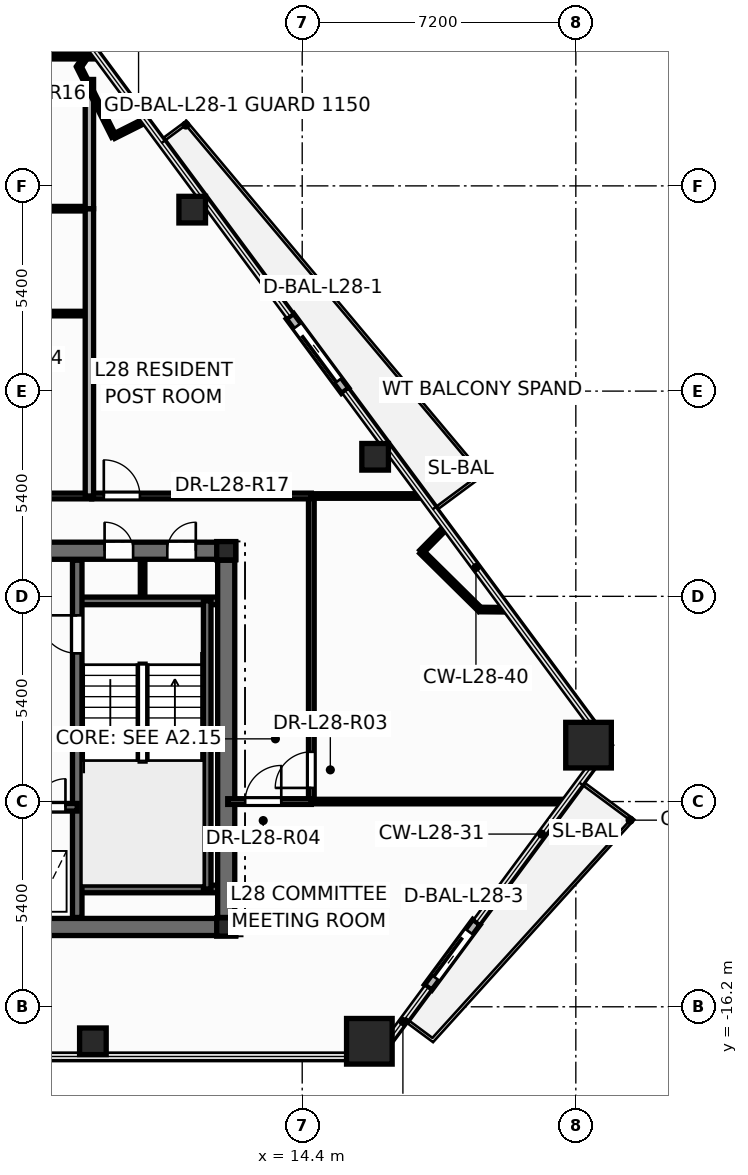
"""IFC4 building model, lengths in metres.
Left out: names, types, materials, properties, quantities, classifications, styles, units other than length and angle.
Written with IfcOpenShell. Run it as: python <this file> out.ifc"""

import sys

from ifc_helpers import new_model, si_unit, direction, frame, frame_2d, origin, origin_2d, place, context, subcontext, project, spatial, rectangle, hollow_rectangle, hollow_circle, i_section, extrude, element, fill, save


model = new_model("IFC4")
c1 = context("Model", 3, precision=1e-05, world=origin(), true_north=direction((0.0, 1.0)))
c2 = subcontext(c1, "Body", "Model", "MODEL_VIEW")
j1 = project(units=[si_unit("LENGTHUNIT", "METRE"), si_unit("PLANEANGLEUNIT", "RADIAN")], contexts=[c1])
p1 = place(None, origin())
s1 = spatial("IfcSite", under=j1, at=p1, CompositionType="ELEMENT")
p2 = place(p1, origin())
s2 = spatial("IfcBuilding", under=s1, at=p2, CompositionType="ELEMENT")
p3 = place(p2, frame((0.0, 0.0, 110.4)))
s3 = spatial("IfcBuildingStorey", under=s2, at=p3, CompositionType="ELEMENT", Elevation=110.4)
for number, where, z_axis, x_axis in (
    (1, (16.167, -17.108, 0.0), (0.0, 0.0, 1.0), (1.0, 0.0, 0.0)),
    (2, (21.934, -9.316, 0.0), (0.0, 0.0, 1.0), (1.0, 0.0, 0.0)),
):
    element("IfcColumn", number, at=place(p3, frame(where, z_axis=z_axis, x_axis=x_axis)), inside=s3, PredefinedType="COLUMN", context=c2, shape_type="SweptSolid", body=[
        extrude(hollow_rectangle(XDim=1.2, YDim=1.2, WallThickness=0.055, at=origin_2d()), origin(), (0.0, 0.0, 1.0), 3.6),
    ])
for number, where, z_axis, x_axis in (
    (3, (8.892, -17.108, 0.0), (0.0, 0.0, 1.0), (1.0, 0.0, 0.0)),
    (4, (16.319, -1.729, 0.0), (0.0, 0.0, 1.0), (1.0, 0.0, 0.0)),
    (5, (11.506, 4.775, 0.0), (0.0, 0.0, 1.0), (1.0, 0.0, 0.0)),
):
    element("IfcColumn", number, at=place(p3, frame(where, z_axis=z_axis, x_axis=x_axis)), inside=s3, PredefinedType="COLUMN", context=c2, shape_type="SweptSolid", body=[
        extrude(hollow_circle(Radius=0.35, WallThickness=0.03, at=origin_2d()), origin(), (0.0, 0.0, 1.0), 3.6),
    ])
for number, where, z_axis, x_axis in (
    (6, (12.4, -14.1, 0.0), (0.0, 0.0, 1.0), (1.0, 0.0, 0.0)),
    (7, (12.4, -4.2, 0.0), (0.0, 0.0, 1.0), (1.0, 0.0, 0.0)),
):
    element("IfcColumn", number, at=place(p3, frame(where, z_axis=z_axis, x_axis=x_axis)), inside=s3, PredefinedType="COLUMN", context=c2, shape_type="SweptSolid", body=[
        extrude(i_section(OverallWidth=0.5, OverallDepth=0.482, WebThickness=0.04, FlangeThickness=0.045, at=origin_2d()), origin(), (0.0, 0.0, 1.0), 3.6),
    ])
p4 = place(p3, frame((15.53, 0.01, -0.015), z_axis=(0.0, 0.0, 1.0), x_axis=(-0.594897308784, 0.803801711868, 0.0)))
e8 = element("IfcWall", 8, at=p4, inside=s3, PredefinedType="STANDARD", context=c2, shape_type="SweptSolid", body=[
    extrude(rectangle(XDim=2.44, YDim=0.24, at=frame_2d((1.22, 0.0))), origin(), (0.0, 0.0, 1.0), 2.728),
])
p5 = place(p4, frame((0.32, 0.0, 0.015)))
e9 = element("IfcOpeningElement", 9, at=p5, cuts=e8, PredefinedType="OPENING", context=c2, shape_type="SweptSolid", body=[
    extrude(rectangle(XDim=1.806, YDim=2.204, at=frame_2d((0.9, 1.102))), frame((0.0, 0.13, 0.0), z_axis=(0.0, -1.0, 0.0), x_axis=(1.0, 0.0, 0.0)), (0.0, 0.0, 1.0), 0.26),
])
p6 = place(p3, frame((17.713, -15.691, -0.015), z_axis=(0.0, 0.0, 1.0), x_axis=(0.59491376708, 0.803789530747, 0.0)))
e10 = element("IfcWall", 10, at=p6, inside=s3, PredefinedType="STANDARD", context=c2, shape_type="SweptSolid", body=[
    extrude(rectangle(XDim=2.14, YDim=0.24, at=frame_2d((1.07, 0.0))), origin(), (0.0, 0.0, 1.0), 2.728),
])
p7 = place(p6, frame((0.32, 0.0, 0.015)))
e11 = element("IfcOpeningElement", 11, at=p7, cuts=e10, PredefinedType="OPENING", context=c2, shape_type="SweptSolid", body=[
    extrude(rectangle(XDim=1.506, YDim=2.204, at=frame_2d((0.75, 1.102))), frame((0.0, 0.13, 0.0), z_axis=(0.0, -1.0, 0.0), x_axis=(1.0, 0.0, 0.0)), (0.0, 0.0, 1.0), 0.26),
])
p8 = place(p3, frame((10.2, -5.52, 0.0), z_axis=(0.0, 0.0, 1.0), x_axis=(0.0, 1.0, 0.0)))
e12 = element("IfcWall", 12, at=p8, inside=s3, PredefinedType="PARTITIONING", context=c2, shape_type="SweptSolid", body=[
    extrude(rectangle(XDim=1.12, YDim=0.12, at=frame_2d((0.56, 0.0))), origin(), (0.0, 0.0, 1.0), 3.35),
])
p9 = place(p3, frame((-12.65, -14.1, 0.0), z_axis=(0.0, 0.0, 1.0), x_axis=(1.0, 0.0, 0.0)))
e13 = element("IfcWall", 13, at=p9, inside=s3, PredefinedType="SHEAR", context=c2, shape_type="SweptSolid", body=[
    extrude(rectangle(XDim=25.3, YDim=0.45, at=frame_2d((12.65, 0.0))), origin(), (0.0, 0.0, 1.0), 3.6),
])
p10 = place(p3, frame((-12.65, -4.2, 0.0), z_axis=(0.0, 0.0, 1.0), x_axis=(1.0, 0.0, 0.0)))
e14 = element("IfcWall", 14, at=p10, inside=s3, PredefinedType="SHEAR", context=c2, shape_type="SweptSolid", body=[
    extrude(rectangle(XDim=25.3, YDim=0.45, at=frame_2d((12.65, 0.0))), origin(), (0.0, 0.0, 1.0), 3.6),
])
p11 = place(p10, frame((1.85, 0.0, 0.0)))
e15 = element("IfcOpeningElement", 15, at=p11, cuts=e14, PredefinedType="OPENING", context=c2, shape_type="SweptSolid", body=[
    extrude(rectangle(XDim=0.756, YDim=2.054, at=frame_2d((0.375, 1.027))), frame((0.0, 0.235, 0.0), z_axis=(0.0, -1.0, 0.0), x_axis=(1.0, 0.0, 0.0)), (0.0, 0.0, 1.0), 0.47),
])
p12 = place(p10, frame((21.85, 0.0, 0.0)))
e16 = element("IfcOpeningElement", 16, at=p12, cuts=e14, PredefinedType="OPENING", context=c2, shape_type="SweptSolid", body=[
    extrude(rectangle(XDim=0.756, YDim=2.054, at=frame_2d((0.375, 1.027))), frame((0.0, 0.235, 0.0), z_axis=(0.0, -1.0, 0.0), x_axis=(1.0, 0.0, 0.0)), (0.0, 0.0, 1.0), 0.47),
])
p13 = place(p10, frame((23.5, 0.0, 0.0)))
e17 = element("IfcOpeningElement", 17, at=p13, cuts=e14, PredefinedType="OPENING", context=c2, shape_type="SweptSolid", body=[
    extrude(rectangle(XDim=0.756, YDim=2.054, at=frame_2d((0.375, 1.027))), frame((0.0, 0.235, 0.0), z_axis=(0.0, -1.0, 0.0), x_axis=(1.0, 0.0, 0.0)), (0.0, 0.0, 1.0), 0.47),
])
p14 = place(p10, frame((5.85, 0.0, 0.0)))
e18 = element("IfcOpeningElement", 18, at=p14, cuts=e14, PredefinedType="OPENING", context=c2, shape_type="SweptSolid", body=[
    extrude(rectangle(XDim=1.006, YDim=2.104, at=frame_2d((0.5, 1.052))), frame((0.0, 0.235, 0.0), z_axis=(0.0, -1.0, 0.0), x_axis=(1.0, 0.0, 0.0)), (0.0, 0.0, 1.0), 0.47),
])
p15 = place(p10, frame((10.35, 0.0, 0.0)))
e19 = element("IfcOpeningElement", 19, at=p15, cuts=e14, PredefinedType="OPENING", context=c2, shape_type="SweptSolid", body=[
    extrude(rectangle(XDim=1.406, YDim=2.154, at=frame_2d((0.7, 1.077))), frame((0.0, 0.235, 0.0), z_axis=(0.0, -1.0, 0.0), x_axis=(1.0, 0.0, 0.0)), (0.0, 0.0, 1.0), 0.47),
])
p16 = place(p10, frame((18.45, 0.0, 0.0)))
e20 = element("IfcOpeningElement", 20, at=p16, cuts=e14, PredefinedType="OPENING", context=c2, shape_type="SweptSolid", body=[
    extrude(rectangle(XDim=1.006, YDim=2.104, at=frame_2d((0.5, 1.052))), frame((0.0, 0.235, 0.0), z_axis=(0.0, -1.0, 0.0), x_axis=(1.0, 0.0, 0.0)), (0.0, 0.0, 1.0), 0.47),
])
for number, where, z_axis, x_axis in (
    (21, (8.48, -5.52, 0.0), (0.0, 0.0, 1.0), (1.0, 0.0, 0.0)),
    (22, (8.48, -13.1, 0.0), (0.0, 0.0, 1.0), (1.0, 0.0, 0.0)),
):
    element("IfcWall", number, at=place(p3, frame(where, z_axis=z_axis, x_axis=x_axis)), inside=s3, PredefinedType="SOLIDWALL", context=c2, shape_type="SweptSolid", body=[
        extrude(rectangle(XDim=3.87, YDim=0.2, at=frame_2d((1.935, 0.0))), origin(), (0.0, 0.0, 1.0), 3.6),
    ])
p17 = place(p3, frame((11.9, -13.1, 0.0), z_axis=(0.0, 0.0, 1.0), x_axis=(0.0, 1.0, 0.0)))
e23 = element("IfcWall", 23, at=p17, inside=s3, PredefinedType="SOLIDWALL", context=c2, shape_type="SweptSolid", body=[
    extrude(rectangle(XDim=7.58, YDim=0.2, at=frame_2d((3.79, 0.0))), origin(), (0.0, 0.0, 1.0), 3.6),
])
p18 = place(p3, frame((8.48, -13.85, 0.0), z_axis=(0.0, 0.0, 1.0), x_axis=(0.0, 1.0, 0.0)))
e24 = element("IfcWall", 24, at=p18, inside=s3, PredefinedType="SHEAR", context=c2, shape_type="SweptSolid", body=[
    extrude(rectangle(XDim=9.4, YDim=0.25, at=frame_2d((4.7, 0.0))), origin(), (0.0, 0.0, 1.0), 3.6),
])
p19 = place(p18, frame((6.95, 0.0, 0.0)))
e25 = element("IfcOpeningElement", 25, at=p19, cuts=e24, PredefinedType="OPENING", context=c2, shape_type="SweptSolid", body=[
    extrude(rectangle(XDim=1.006, YDim=2.104, at=frame_2d((0.5, 1.052))), frame((0.0, 0.135, 0.0), z_axis=(0.0, -1.0, 0.0), x_axis=(1.0, 0.0, 0.0)), (0.0, 0.0, 1.0), 0.27),
])
p20 = place(p3, frame((5.12, -10.95, 0.0), z_axis=(0.0, 0.0, 1.0), x_axis=(1.0, 0.0, 0.0)))
e26 = element("IfcWall", 26, at=p20, inside=s3, PredefinedType="SOLIDWALL", context=c2, shape_type="SweptSolid", body=[
    extrude(rectangle(XDim=3.36, YDim=0.2, at=frame_2d((1.68, 0.0))), origin(), (0.0, 0.0, 1.0), 3.6),
])
p21 = place(p20, frame((0.42, 0.0, 0.0)))
e27 = element("IfcOpeningElement", 27, at=p21, cuts=e26, PredefinedType="OPENING", context=c2, shape_type="SweptSolid", body=[
    extrude(rectangle(XDim=1.106, YDim=2.104, at=frame_2d((0.55, 1.052))), frame((0.0, 0.11, 0.0), z_axis=(0.0, -1.0, 0.0), x_axis=(1.0, 0.0, 0.0)), (0.0, 0.0, 1.0), 0.22),
])
p22 = place(p20, frame((2.3, 0.0, 0.0)))
e28 = element("IfcOpeningElement", 28, at=p22, cuts=e26, PredefinedType="OPENING", context=c2, shape_type="SweptSolid", body=[
    extrude(rectangle(XDim=0.756, YDim=2.054, at=frame_2d((0.375, 1.027))), frame((0.0, 0.11, 0.0), z_axis=(0.0, -1.0, 0.0), x_axis=(1.0, 0.0, 0.0)), (0.0, 0.0, 1.0), 0.22),
])
p23 = place(p3, frame((12.4, -13.85, 0.0), z_axis=(0.0, 0.0, 1.0), x_axis=(0.0, 1.0, 0.0)))
e29 = element("IfcWall", 29, at=p23, inside=s3, PredefinedType="SHEAR", context=c2, shape_type="SweptSolid", body=[
    extrude(rectangle(XDim=9.4, YDim=0.45, at=frame_2d((4.7, 0.0))), origin(), (0.0, 0.0, 1.0), 3.6),
])
p24 = place(p3, frame((14.64, -10.8, 0.0), z_axis=(0.0, 0.0, 1.0), x_axis=(0.0, 1.0, 0.0)))
e30 = element("IfcWall", 30, at=p24, inside=s3, PredefinedType="PARTITIONING", context=c2, shape_type="SweptSolid", body=[
    extrude(rectangle(XDim=8.04, YDim=0.15, at=frame_2d((4.02, 0.0))), origin(), (0.0, 0.0, 1.0), 2.325),
])
p25 = place(p24, frame((0.359, 0.0, 0.0)))
e31 = element("IfcOpeningElement", 31, at=p25, cuts=e30, PredefinedType="OPENING", context=c2, shape_type="SweptSolid", body=[
    extrude(rectangle(XDim=0.956, YDim=2.104, at=frame_2d((0.475, 1.052))), frame((0.0, 0.085, 0.0), z_axis=(0.0, -1.0, 0.0), x_axis=(1.0, 0.0, 0.0)), (0.0, 0.0, 1.0), 0.17),
])
p26 = place(p3, frame((14.64, -10.8, 0.0), z_axis=(0.0, 0.0, 1.0), x_axis=(1.0, 0.0, 0.0)))
e32 = element("IfcWall", 32, at=p26, inside=s3, PredefinedType="PARTITIONING", context=c2, shape_type="SweptSolid", body=[
    extrude(rectangle(XDim=6.693, YDim=0.12, at=frame_2d((3.347, 0.0))), origin(), (0.0, 0.0, 1.0), 2.713),
])
p27 = place(p3, frame((2.36, 8.8, 0.0), z_axis=(0.0, 0.0, 1.0), x_axis=(1.0, 0.0, 0.0)))
e33 = element("IfcWall", 33, at=p27, inside=s3, PredefinedType="PARTITIONING", context=c2, shape_type="SweptSolid", body=[
    extrude(rectangle(XDim=6.56, YDim=0.12, at=frame_2d((3.28, 0.0))), origin(), (0.0, 0.0, 1.0), 2.325),
])
p28 = place(p27, frame((4.384, 0.0, 0.0)))
e34 = element("IfcOpeningElement", 34, at=p28, cuts=e33, PredefinedType="OPENING", context=c2, shape_type="SweptSolid", body=[
    extrude(rectangle(XDim=0.926, YDim=2.104, at=frame_2d((0.46, 1.052))), frame((0.0, 0.07, 0.0), z_axis=(0.0, -1.0, 0.0), x_axis=(1.0, 0.0, 0.0)), (0.0, 0.0, 1.0), 0.14),
])
p29 = place(p3, frame((2.36, -2.76, 0.0), z_axis=(0.0, 0.0, 1.0), x_axis=(1.0, 0.0, 0.0)))
e35 = element("IfcWall", 35, at=p29, inside=s3, PredefinedType="PARTITIONING", context=c2, shape_type="SweptSolid", body=[
    extrude(rectangle(XDim=6.5, YDim=0.15, at=frame_2d((3.25, 0.0))), origin(), (0.0, 0.0, 1.0), 2.325),
])
p30 = place(p29, frame((0.36, 0.0, 0.0)))
e36 = element("IfcOpeningElement", 36, at=p30, cuts=e35, PredefinedType="OPENING", context=c2, shape_type="SweptSolid", body=[
    extrude(rectangle(XDim=0.956, YDim=2.104, at=frame_2d((0.475, 1.052))), frame((0.0, 0.085, 0.0), z_axis=(0.0, -1.0, 0.0), x_axis=(1.0, 0.0, 0.0)), (0.0, 0.0, 1.0), 0.17),
])
p31 = place(p3, frame((8.862, -2.76, 0.0), z_axis=(0.0, 0.0, 1.0), x_axis=(1.0, 0.0, 0.0)))
e37 = element("IfcWall", 37, at=p31, inside=s3, PredefinedType="PARTITIONING", context=c2, shape_type="SweptSolid", body=[
    extrude(rectangle(XDim=5.778, YDim=0.15, at=frame_2d((2.889, 0.0))), origin(), (0.0, 0.0, 1.0), 3.35),
])
p32 = place(p31, frame((0.317, 0.0, 0.0)))
e38 = element("IfcOpeningElement", 38, at=p32, cuts=e37, PredefinedType="OPENING", context=c2, shape_type="SweptSolid", body=[
    extrude(rectangle(XDim=0.956, YDim=2.104, at=frame_2d((0.475, 1.052))), frame((0.0, 0.085, 0.0), z_axis=(0.0, -1.0, 0.0), x_axis=(1.0, 0.0, 0.0)), (0.0, 0.0, 1.0), 0.17),
])
p33 = place(p3, frame((3.84, 2.04, 0.0), z_axis=(0.0, 0.0, 1.0), x_axis=(1.0, 0.0, 0.0)))
e39 = element("IfcWall", 39, at=p33, inside=s3, PredefinedType="PARTITIONING", context=c2, shape_type="SweptSolid", body=[
    extrude(rectangle(XDim=4.96, YDim=0.12, at=frame_2d((2.48, 0.0))), origin(), (0.0, 0.0, 1.0), 2.325),
])
p34 = place(p33, frame((0.397, 0.0, 0.0)))
e40 = element("IfcOpeningElement", 40, at=p34, cuts=e39, PredefinedType="OPENING", context=c2, shape_type="SweptSolid", body=[
    extrude(rectangle(XDim=0.926, YDim=2.104, at=frame_2d((0.46, 1.052))), frame((0.0, 0.07, 0.0), z_axis=(0.0, -1.0, 0.0), x_axis=(1.0, 0.0, 0.0)), (0.0, 0.0, 1.0), 0.14),
])
p35 = place(p3, frame((3.9, 4.8, 0.0), z_axis=(0.0, 0.0, 1.0), x_axis=(1.0, 0.0, 0.0)))
e41 = element("IfcWall", 41, at=p35, inside=s3, PredefinedType="PARTITIONING", context=c2, shape_type="SweptSolid", body=[
    extrude(rectangle(XDim=4.9, YDim=0.12, at=frame_2d((2.45, 0.0))), origin(), (0.0, 0.0, 1.0), 2.325),
])
p36 = place(p35, frame((0.359, 0.0, 0.0)))
e42 = element("IfcOpeningElement", 42, at=p36, cuts=e41, PredefinedType="OPENING", context=c2, shape_type="SweptSolid", body=[
    extrude(rectangle(XDim=0.926, YDim=2.104, at=frame_2d((0.46, 1.052))), frame((0.0, 0.07, 0.0), z_axis=(0.0, -1.0, 0.0), x_axis=(1.0, 0.0, 0.0)), (0.0, 0.0, 1.0), 0.14),
])
p37 = place(p3, frame((8.8, -2.76, 0.0), z_axis=(0.0, 0.0, 1.0), x_axis=(0.0, 1.0, 0.0)))
e43 = element("IfcWall", 43, at=p37, inside=s3, PredefinedType="PARTITIONING", context=c2, shape_type="SweptSolid", body=[
    extrude(rectangle(XDim=7.56, YDim=0.22, at=frame_2d((3.78, 0.0))), origin(), (0.0, 0.0, 1.0), 2.325),
])
p38 = place(p3, frame((8.8, 4.8, 0.0), z_axis=(0.0, 0.0, 1.0), x_axis=(0.0, 1.0, 0.0)))
e44 = element("IfcWall", 44, at=p38, inside=s3, PredefinedType="PARTITIONING", context=c2, shape_type="SweptSolid", body=[
    extrude(rectangle(XDim=3.4, YDim=0.22, at=frame_2d((1.7, 0.0))), origin(), (0.0, 0.0, 1.0), 2.325),
])
p39 = place(p3, frame((14.64, -2.76, 0.0), z_axis=(0.0, 0.0, 1.0), x_axis=(1.0, 0.0, 0.0)))
e45 = element("IfcWall", 45, at=p39, inside=s3, PredefinedType="PARTITIONING", context=c2, shape_type="SweptSolid", body=[
    extrude(rectangle(XDim=2.94, YDim=0.12, at=frame_2d((1.47, 0.0))), origin(), (0.0, 0.0, 1.0), 2.713),
])
p40 = place(p3, frame((12.44, -10.8, 0.0), z_axis=(0.0, 0.0, 1.0), x_axis=(1.0, 0.0, 0.0)))
e46 = element("IfcWall", 46, at=p40, inside=s3, PredefinedType="PARTITIONING", context=c2, shape_type="SweptSolid", body=[
    extrude(rectangle(XDim=2.2, YDim=0.15, at=frame_2d((1.1, 0.0))), origin(), (0.0, 0.0, 1.0), 2.713),
])
p41 = place(p40, frame((0.459, 0.0, 0.0)))
e47 = element("IfcOpeningElement", 47, at=p41, cuts=e46, PredefinedType="OPENING", context=c2, shape_type="SweptSolid", body=[
    extrude(rectangle(XDim=0.956, YDim=2.104, at=frame_2d((0.475, 1.052))), frame((0.0, 0.085, 0.0), z_axis=(0.0, -1.0, 0.0), x_axis=(1.0, 0.0, 0.0)), (0.0, 0.0, 1.0), 0.17),
])
p42 = place(p3, frame((9.442, 6.704, 0.0), z_axis=(0.0, 0.0, 1.0), x_axis=(-0.44873934971, 0.893662685817, 0.0)))
e48 = element("IfcWall", 48, at=p42, inside=s3, PredefinedType="PARTITIONING", context=c2, shape_type="SweptSolid", body=[
    extrude(rectangle(XDim=2.047, YDim=0.12, at=frame_2d((1.024, 0.0))), origin(), (0.0, 0.0, 1.0), 3.35),
])
p43 = place(p3, frame((19.077, -5.747, 0.0), z_axis=(0.0, 0.0, 1.0), x_axis=(-0.711889877925, 0.702291108949, 0.0)))
e49 = element("IfcWall", 49, at=p43, inside=s3, PredefinedType="PARTITIONING", context=c2, shape_type="SweptSolid", body=[
    extrude(rectangle(XDim=2.162, YDim=0.12, at=frame_2d((1.081, 0.0))), origin(), (0.0, 0.0, 1.0), 3.35),
])
p44 = place(p3, frame((10.26, 7.114, 0.0), z_axis=(0.0, 0.0, 1.0), x_axis=(-0.893678540504, -0.448707773771, 0.0)))
e50 = element("IfcWall", 50, at=p44, inside=s3, PredefinedType="PARTITIONING", context=c2, shape_type="SweptSolid", body=[
    extrude(rectangle(XDim=0.915, YDim=0.12, at=frame_2d((0.457, 0.0))), origin(), (0.0, 0.0, 1.0), 2.713),
])
p45 = place(p3, frame((17.538, -4.229, 0.0), z_axis=(0.0, 0.0, 1.0), x_axis=(0.702387049148, 0.711795218577, 0.0)))
e51 = element("IfcWall", 51, at=p45, inside=s3, PredefinedType="PARTITIONING", context=c2, shape_type="SweptSolid", body=[
    extrude(rectangle(XDim=0.908, YDim=0.12, at=frame_2d((0.454, 0.0))), origin(), (0.0, 0.0, 1.0), 2.713),
])
p46 = place(p3, frame((19.783, -5.753, 0.0), z_axis=(0.0, 0.0, 1.0), x_axis=(-0.999965519438, 0.008304211926, 0.0)))
e52 = element("IfcWall", 52, at=p46, inside=s3, PredefinedType="PARTITIONING", context=c2, shape_type="SweptSolid", body=[
    extrude(rectangle(XDim=0.706, YDim=0.12, at=frame_2d((0.353, 0.0))), origin(), (0.0, 0.0, 1.0), 2.713),
])
p47 = place(p3, frame((8.523, 8.533, 0.0), z_axis=(0.0, 0.0, 1.0), x_axis=(0.569035523294, 0.822312941179, 0.0)))
e53 = element("IfcWall", 53, at=p47, inside=s3, PredefinedType="PARTITIONING", context=c2, shape_type="SweptSolid", body=[
    extrude(rectangle(XDim=0.582, YDim=0.12, at=frame_2d((0.291, 0.0))), origin(), (0.0, 0.0, 1.0), 2.713),
])
p48 = place(p5, origin())
e54 = element("IfcDoor", 54, at=p48, inside=s3, OperationType="SLIDING_TO_LEFT", PredefinedType="DOOR", context=c2, shape_type="SweptSolid", body=[
    extrude(rectangle(XDim=1.8, YDim=2.2, at=frame_2d((0.9, 1.1))), frame((0.0, 0.025, 0.0), z_axis=(0.0, -1.0, 0.0), x_axis=(1.0, 0.0, 0.0)), (0.0, 0.0, 1.0), 0.05),
])
fill(e9, e54)
p49 = place(p7, origin())
e55 = element("IfcDoor", 55, at=p49, inside=s3, OperationType="SLIDING_TO_RIGHT", PredefinedType="DOOR", context=c2, shape_type="SweptSolid", body=[
    extrude(rectangle(XDim=1.5, YDim=2.2, at=frame_2d((0.75, 1.1))), frame((0.0, 0.025, 0.0), z_axis=(0.0, -1.0, 0.0), x_axis=(1.0, 0.0, 0.0)), (0.0, 0.0, 1.0), 0.05),
])
fill(e11, e55)
p50 = place(p19, origin())
e56 = element("IfcDoor", 56, at=p50, inside=s3, OperationType="SINGLE_SWING_RIGHT", PredefinedType="DOOR", context=c2, shape_type="SweptSolid", body=[
    extrude(rectangle(XDim=1.0, YDim=2.1, at=frame_2d((0.5, 1.05))), frame((0.0, 0.025, 0.0), z_axis=(0.0, -1.0, 0.0), x_axis=(1.0, 0.0, 0.0)), (0.0, 0.0, 1.0), 0.05),
])
fill(e25, e56)
p51 = place(p22, origin())
e57 = element("IfcDoor", 57, at=p51, inside=s3, OperationType="SINGLE_SWING_RIGHT", PredefinedType="DOOR", context=c2, shape_type="SweptSolid", body=[
    extrude(rectangle(XDim=0.75, YDim=2.05, at=frame_2d((0.375, 1.025))), frame((0.0, 0.025, 0.0), z_axis=(0.0, -1.0, 0.0), x_axis=(1.0, 0.0, 0.0)), (0.0, 0.0, 1.0), 0.05),
])
fill(e28, e57)
p52 = place(p12, origin())
e58 = element("IfcDoor", 58, at=p52, inside=s3, OperationType="SINGLE_SWING_LEFT", PredefinedType="DOOR", context=c2, shape_type="SweptSolid", body=[
    extrude(rectangle(XDim=0.75, YDim=2.05, at=frame_2d((0.375, 1.025))), frame((0.0, 0.025, 0.0), z_axis=(0.0, -1.0, 0.0), x_axis=(1.0, 0.0, 0.0)), (0.0, 0.0, 1.0), 0.05),
])
fill(e16, e58)
p53 = place(p13, origin())
e59 = element("IfcDoor", 59, at=p53, inside=s3, OperationType="SINGLE_SWING_RIGHT", PredefinedType="DOOR", context=c2, shape_type="SweptSolid", body=[
    extrude(rectangle(XDim=0.75, YDim=2.05, at=frame_2d((0.375, 1.025))), frame((0.0, 0.025, 0.0), z_axis=(0.0, -1.0, 0.0), x_axis=(1.0, 0.0, 0.0)), (0.0, 0.0, 1.0), 0.05),
])
fill(e17, e59)
p54 = place(p25, origin())
e60 = element("IfcDoor", 60, at=p54, inside=s3, OperationType="SINGLE_SWING_LEFT", PredefinedType="DOOR", context=c2, shape_type="SweptSolid", body=[
    extrude(rectangle(XDim=0.95, YDim=2.1, at=frame_2d((0.475, 1.05))), frame((0.0, 0.025, 0.0), z_axis=(0.0, -1.0, 0.0), x_axis=(1.0, 0.0, 0.0)), (0.0, 0.0, 1.0), 0.05),
])
fill(e31, e60)
p55 = place(p41, origin())
e61 = element("IfcDoor", 61, at=p55, inside=s3, OperationType="SINGLE_SWING_RIGHT", PredefinedType="DOOR", context=c2, shape_type="SweptSolid", body=[
    extrude(rectangle(XDim=0.95, YDim=2.1, at=frame_2d((0.475, 1.05))), frame((0.0, 0.025, 0.0), z_axis=(0.0, -1.0, 0.0), x_axis=(1.0, 0.0, 0.0)), (0.0, 0.0, 1.0), 0.05),
])
fill(e47, e61)
p56 = place(p32, origin())
e62 = element("IfcDoor", 62, at=p56, inside=s3, OperationType="SINGLE_SWING_LEFT", PredefinedType="DOOR", context=c2, shape_type="SweptSolid", body=[
    extrude(rectangle(XDim=0.95, YDim=2.1, at=frame_2d((0.475, 1.05))), frame((0.0, 0.025, 0.0), z_axis=(0.0, -1.0, 0.0), x_axis=(1.0, 0.0, 0.0)), (0.0, 0.0, 1.0), 0.05),
])
fill(e38, e62)
save(model, sys.argv[1])
